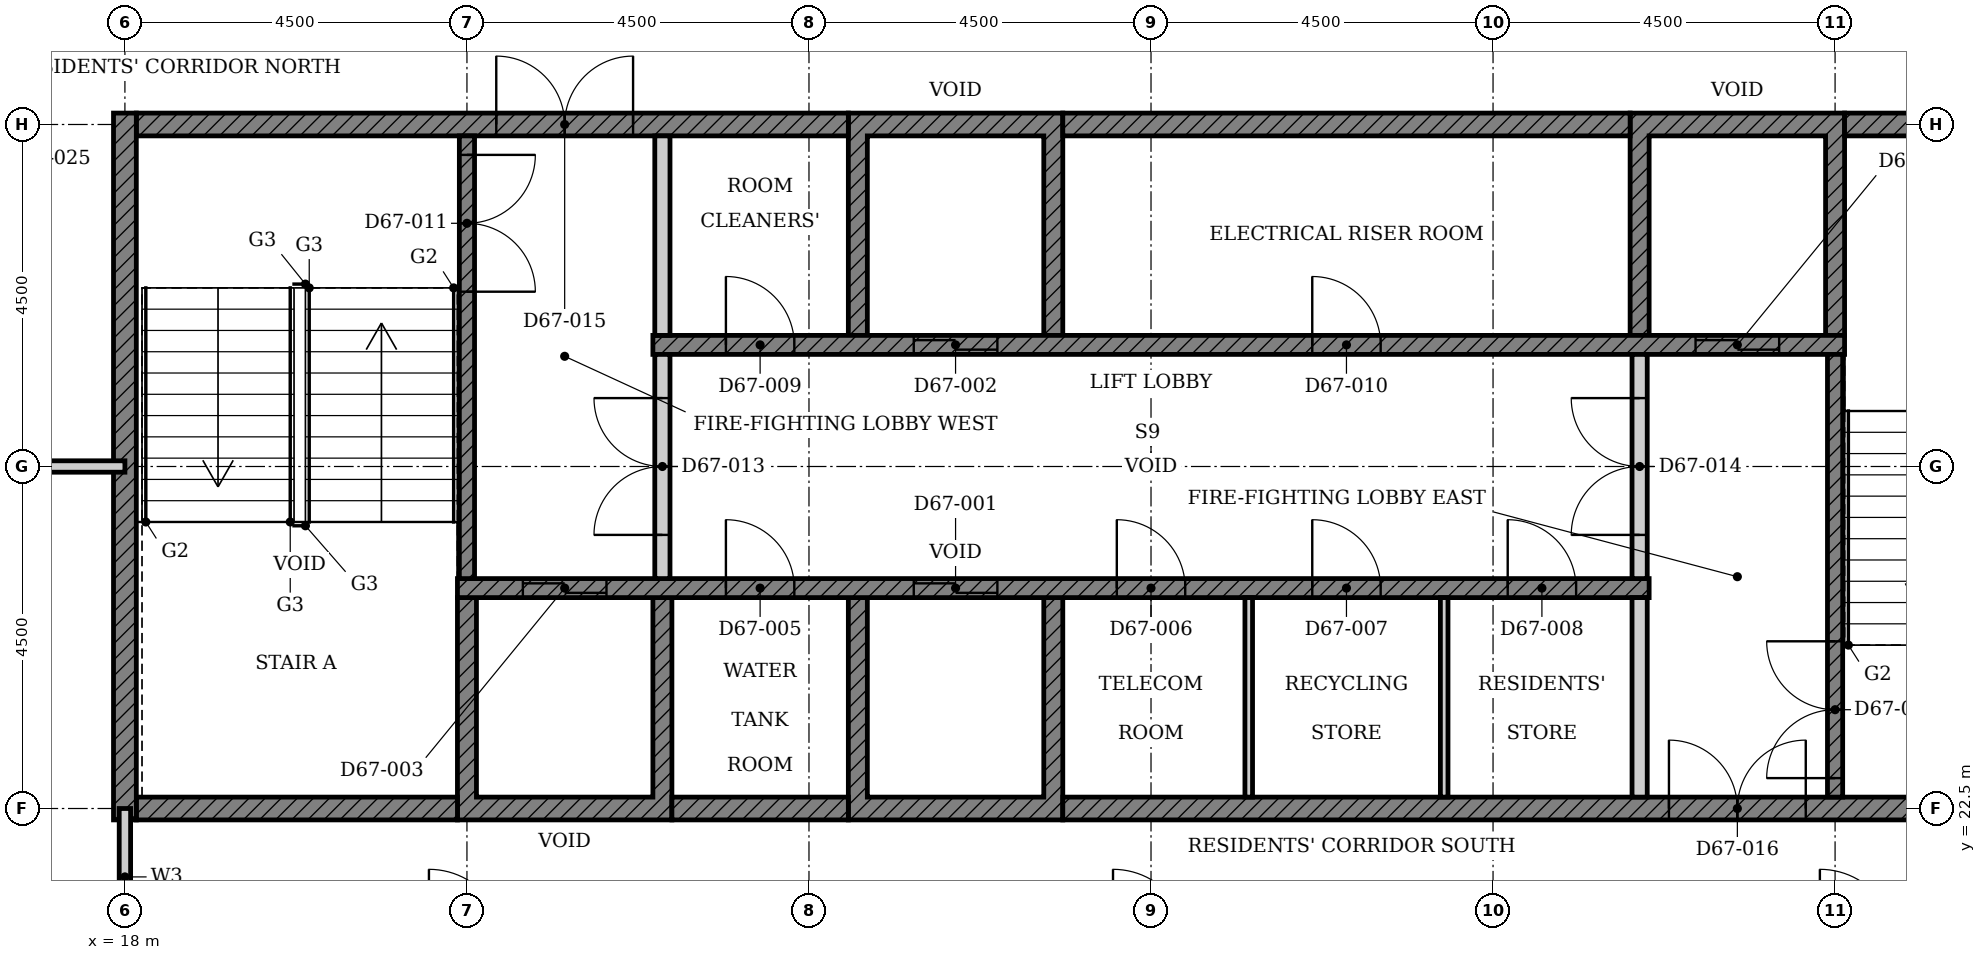
"""IFC4 building model, lengths in metres.
Left out: names, types, materials, properties, quantities, classifications, styles, units other than length and angle.
Written with IfcOpenShell. Run it as: python <this file> out.ifc"""

import sys

from ifc_helpers import new_model, si_unit, direction, frame, frame_2d, origin, place, context, subcontext, project, spatial, polyline, rectangle, outline, extrude, element, fill, save


model = new_model("IFC4")
c1 = context("Model", 3, precision=1e-05, world=origin(), true_north=direction((0.0, 1.0)))
c2 = subcontext(c1, "Body", "Model", "MODEL_VIEW")
j1 = project(units=[si_unit("LENGTHUNIT", "METRE"), si_unit("PLANEANGLEUNIT", "RADIAN")], contexts=[c1])
p1 = place(None, origin())
s1 = spatial("IfcSite", under=j1, at=p1, CompositionType="ELEMENT")
p2 = place(p1, origin())
s2 = spatial("IfcBuilding", under=s1, at=p2, CompositionType="ELEMENT")
p3 = place(p2, frame((0.0, 0.0, 263.8)))
s3 = spatial("IfcBuildingStorey", under=s2, at=p3, CompositionType="ELEMENT", Elevation=263.8)
p4 = place(p3, origin())
e1 = element("IfcWall", 1, at=p4, inside=s3, PredefinedType="SHEAR", context=c2, shape_type="SweptSolid", body=[
    extrude(outline(polyline([(22.375, 22.35), (25.197, 22.35), (25.197, 25.275), (24.947, 25.275), (24.947, 22.65), (22.625, 22.65), (22.625, 25.275), (22.375, 25.275), (22.375, 22.35)])), origin(), (0.0, 0.0, 1.0), 3.4),
])
p5 = place(p3, origin())
e2 = element("IfcWall", 2, at=p5, inside=s3, PredefinedType="SHEAR", context=c2, shape_type="SweptSolid", body=[
    extrude(outline(polyline([(27.518, 22.35), (30.339, 22.35), (30.339, 25.275), (30.089, 25.275), (30.089, 22.65), (27.768, 22.65), (27.768, 25.275), (27.518, 25.275), (27.518, 22.35)])), origin(), (0.0, 0.0, 1.0), 3.4),
])
p6 = place(p3, origin())
e3 = element("IfcWall", 3, at=p6, inside=s3, PredefinedType="SHEAR", context=c2, shape_type="SweptSolid", body=[
    extrude(outline(polyline([(27.518, 28.725), (27.768, 28.725), (27.768, 31.35), (30.089, 31.35), (30.089, 28.725), (30.339, 28.725), (30.339, 31.65), (27.518, 31.65), (27.518, 28.725)])), origin(), (0.0, 0.0, 1.0), 3.4),
])
p7 = place(p3, origin())
e4 = element("IfcWall", 4, at=p7, inside=s3, PredefinedType="SHEAR", context=c2, shape_type="SweptSolid", body=[
    extrude(outline(polyline([(37.803, 28.725), (38.053, 28.725), (38.053, 31.35), (40.375, 31.35), (40.375, 28.725), (40.625, 28.725), (40.625, 31.65), (37.803, 31.65), (37.803, 28.725)])), origin(), (0.0, 0.0, 1.0), 3.4),
])
p8 = place(p3, frame((18.15, 22.5, 0.0), z_axis=(0.0, 0.0, 1.0), x_axis=(1.0, 0.0, 0.0)))
e5 = element("IfcWall", 5, at=p8, inside=s3, PredefinedType="SHEAR", context=c2, shape_type="SweptSolid", body=[
    extrude(rectangle(XDim=4.225, YDim=0.3, at=frame_2d((2.113, 0.0))), origin(), (0.0, 0.0, 1.0), 3.4),
])
p9 = place(p3, frame((25.197, 22.5, 0.0), z_axis=(0.0, 0.0, 1.0), x_axis=(1.0, 0.0, 0.0)))
e6 = element("IfcWall", 6, at=p9, inside=s3, PredefinedType="SHEAR", context=c2, shape_type="SweptSolid", body=[
    extrude(rectangle(XDim=2.321, YDim=0.3, at=frame_2d((1.161, 0.0))), origin(), (0.0, 0.0, 1.0), 3.4),
])
p10 = place(p3, frame((30.339, 22.5, 0.0), z_axis=(0.0, 0.0, 1.0), x_axis=(1.0, 0.0, 0.0)))
e7 = element("IfcWall", 7, at=p10, inside=s3, PredefinedType="SHEAR", context=c2, shape_type="SweptSolid", body=[
    extrude(rectangle(XDim=14.511, YDim=0.3, at=frame_2d((7.255, 0.0))), origin(), (0.0, 0.0, 1.0), 3.4),
])
p11 = place(p10, frame((7.975, 0.0, 0.0)))
e8 = element("IfcOpeningElement", 8, at=p11, cuts=e7, PredefinedType="OPENING", context=c2, shape_type="SweptSolid", body=[
    extrude(rectangle(XDim=1.8, YDim=2.1, at=frame_2d((0.9, 1.05))), frame((0.0, 0.16, 0.0), z_axis=(0.0, -1.0, 0.0), x_axis=(1.0, 0.0, 0.0)), (0.0, 0.0, 1.0), 0.32),
])
p12 = place(p3, frame((18.15, 31.5, 0.0), z_axis=(0.0, 0.0, 1.0), x_axis=(1.0, 0.0, 0.0)))
e9 = element("IfcWall", 9, at=p12, inside=s3, PredefinedType="SHEAR", context=c2, shape_type="SweptSolid", body=[
    extrude(rectangle(XDim=9.368, YDim=0.3, at=frame_2d((4.684, 0.0))), origin(), (0.0, 0.0, 1.0), 3.4),
])
p13 = place(p12, frame((4.736, 0.0, 0.0)))
e10 = element("IfcOpeningElement", 10, at=p13, cuts=e9, PredefinedType="OPENING", context=c2, shape_type="SweptSolid", body=[
    extrude(rectangle(XDim=1.8, YDim=2.1, at=frame_2d((0.9, 1.05))), frame((0.0, 0.16, 0.0), z_axis=(0.0, -1.0, 0.0), x_axis=(1.0, 0.0, 0.0)), (0.0, 0.0, 1.0), 0.32),
])
p14 = place(p3, frame((30.339, 31.5, 0.0), z_axis=(0.0, 0.0, 1.0), x_axis=(1.0, 0.0, 0.0)))
e11 = element("IfcWall", 11, at=p14, inside=s3, PredefinedType="SHEAR", context=c2, shape_type="SweptSolid", body=[
    extrude(rectangle(XDim=7.464, YDim=0.3, at=frame_2d((3.732, 0.0))), origin(), (0.0, 0.0, 1.0), 3.4),
])
p15 = place(p3, frame((40.625, 31.5, 0.0), z_axis=(0.0, 0.0, 1.0), x_axis=(1.0, 0.0, 0.0)))
e12 = element("IfcWall", 12, at=p15, inside=s3, PredefinedType="SHEAR", context=c2, shape_type="SweptSolid", body=[
    extrude(rectangle(XDim=4.225, YDim=0.3, at=frame_2d((2.113, 0.0))), origin(), (0.0, 0.0, 1.0), 3.4),
])
p16 = place(p3, frame((18.0, 22.35, 0.0), z_axis=(0.0, 0.0, 1.0), x_axis=(0.0, 1.0, 0.0)))
e13 = element("IfcWall", 13, at=p16, inside=s3, PredefinedType="SHEAR", context=c2, shape_type="SweptSolid", body=[
    extrude(rectangle(XDim=9.3, YDim=0.3, at=frame_2d((4.65, 0.0))), origin(), (0.0, 0.0, 1.0), 3.4),
])
p17 = place(p3, frame((22.375, 25.4, 0.0), z_axis=(0.0, 0.0, 1.0), x_axis=(1.0, 0.0, 0.0)))
e14 = element("IfcWall", 14, at=p17, inside=s3, PredefinedType="SHEAR", context=c2, shape_type="SweptSolid", body=[
    extrude(rectangle(XDim=15.678, YDim=0.25, at=frame_2d((7.839, 0.0))), origin(), (0.0, 0.0, 1.0), 3.4),
])
p18 = place(p17, frame((6.004, 0.0, 0.0)))
e15 = element("IfcOpeningElement", 15, at=p18, cuts=e14, PredefinedType="OPENING", context=c2, shape_type="SweptSolid", body=[
    extrude(rectangle(XDim=1.1, YDim=2.1, at=frame_2d((0.55, 1.05))), frame((0.0, 0.135, 0.0), z_axis=(0.0, -1.0, 0.0), x_axis=(1.0, 0.0, 0.0)), (0.0, 0.0, 1.0), 0.27),
])
p19 = place(p17, frame((0.861, 0.0, 0.0)))
e16 = element("IfcOpeningElement", 16, at=p19, cuts=e14, PredefinedType="OPENING", context=c2, shape_type="SweptSolid", body=[
    extrude(rectangle(XDim=1.1, YDim=2.1, at=frame_2d((0.55, 1.05))), frame((0.0, 0.135, 0.0), z_axis=(0.0, -1.0, 0.0), x_axis=(1.0, 0.0, 0.0)), (0.0, 0.0, 1.0), 0.27),
])
p20 = place(p17, frame((3.532, 0.0, 0.0)))
e17 = element("IfcOpeningElement", 17, at=p20, cuts=e14, PredefinedType="OPENING", context=c2, shape_type="SweptSolid", body=[
    extrude(rectangle(XDim=0.9, YDim=2.1, at=frame_2d((0.45, 1.05))), frame((0.0, 0.135, 0.0), z_axis=(0.0, -1.0, 0.0), x_axis=(1.0, 0.0, 0.0)), (0.0, 0.0, 1.0), 0.27),
])
p21 = place(p17, frame((8.675, 0.0, 0.0)))
e18 = element("IfcOpeningElement", 18, at=p21, cuts=e14, PredefinedType="OPENING", context=c2, shape_type="SweptSolid", body=[
    extrude(rectangle(XDim=0.9, YDim=2.1, at=frame_2d((0.45, 1.05))), frame((0.0, 0.135, 0.0), z_axis=(0.0, -1.0, 0.0), x_axis=(1.0, 0.0, 0.0)), (0.0, 0.0, 1.0), 0.27),
])
p22 = place(p17, frame((11.246, 0.0, 0.0)))
e19 = element("IfcOpeningElement", 19, at=p22, cuts=e14, PredefinedType="OPENING", context=c2, shape_type="SweptSolid", body=[
    extrude(rectangle(XDim=0.9, YDim=2.1, at=frame_2d((0.45, 1.05))), frame((0.0, 0.135, 0.0), z_axis=(0.0, -1.0, 0.0), x_axis=(1.0, 0.0, 0.0)), (0.0, 0.0, 1.0), 0.27),
])
p23 = place(p17, frame((13.818, 0.0, 0.0)))
e20 = element("IfcOpeningElement", 20, at=p23, cuts=e14, PredefinedType="OPENING", context=c2, shape_type="SweptSolid", body=[
    extrude(rectangle(XDim=0.9, YDim=2.1, at=frame_2d((0.45, 1.05))), frame((0.0, 0.135, 0.0), z_axis=(0.0, -1.0, 0.0), x_axis=(1.0, 0.0, 0.0)), (0.0, 0.0, 1.0), 0.27),
])
p24 = place(p3, frame((24.947, 28.6, 0.0), z_axis=(0.0, 0.0, 1.0), x_axis=(1.0, 0.0, 0.0)))
e21 = element("IfcWall", 21, at=p24, inside=s3, PredefinedType="SHEAR", context=c2, shape_type="SweptSolid", body=[
    extrude(rectangle(XDim=15.678, YDim=0.25, at=frame_2d((7.839, 0.0))), origin(), (0.0, 0.0, 1.0), 3.4),
])
p25 = place(p24, frame((3.432, 0.0, 0.0)))
e22 = element("IfcOpeningElement", 22, at=p25, cuts=e21, PredefinedType="OPENING", context=c2, shape_type="SweptSolid", body=[
    extrude(rectangle(XDim=1.1, YDim=2.1, at=frame_2d((0.55, 1.05))), frame((0.0, 0.135, 0.0), z_axis=(0.0, -1.0, 0.0), x_axis=(1.0, 0.0, 0.0)), (0.0, 0.0, 1.0), 0.27),
])
p26 = place(p24, frame((13.718, 0.0, 0.0)))
e23 = element("IfcOpeningElement", 23, at=p26, cuts=e21, PredefinedType="OPENING", context=c2, shape_type="SweptSolid", body=[
    extrude(rectangle(XDim=1.1, YDim=2.1, at=frame_2d((0.55, 1.05))), frame((0.0, 0.135, 0.0), z_axis=(0.0, -1.0, 0.0), x_axis=(1.0, 0.0, 0.0)), (0.0, 0.0, 1.0), 0.27),
])
p27 = place(p24, frame((0.961, 0.0, 0.0)))
e24 = element("IfcOpeningElement", 24, at=p27, cuts=e21, PredefinedType="OPENING", context=c2, shape_type="SweptSolid", body=[
    extrude(rectangle(XDim=0.9, YDim=2.1, at=frame_2d((0.45, 1.05))), frame((0.0, 0.135, 0.0), z_axis=(0.0, -1.0, 0.0), x_axis=(1.0, 0.0, 0.0)), (0.0, 0.0, 1.0), 0.27),
])
p28 = place(p24, frame((8.675, 0.0, 0.0)))
e25 = element("IfcOpeningElement", 25, at=p28, cuts=e21, PredefinedType="OPENING", context=c2, shape_type="SweptSolid", body=[
    extrude(rectangle(XDim=0.9, YDim=2.1, at=frame_2d((0.45, 1.05))), frame((0.0, 0.135, 0.0), z_axis=(0.0, -1.0, 0.0), x_axis=(1.0, 0.0, 0.0)), (0.0, 0.0, 1.0), 0.27),
])
p29 = place(p3, frame((37.928, 22.65, 0.0), z_axis=(0.0, 0.0, 1.0), x_axis=(0.0, 1.0, 0.0)))
e26 = element("IfcWall", 26, at=p29, inside=s3, PredefinedType="PARTITIONING", context=c2, shape_type="SweptSolid", body=[
    extrude(rectangle(XDim=2.625, YDim=0.2, at=frame_2d((1.312, 0.0))), origin(), (0.0, 0.0, 1.0), 3.4),
])
for number, where, z_axis, x_axis in (
    (27, (32.786, 22.65, 0.0), (0.0, 0.0, 1.0), (0.0, 1.0, 0.0)),
    (28, (35.357, 22.65, 0.0), (0.0, 0.0, 1.0), (0.0, 1.0, 0.0)),
):
    element("IfcWall", number, at=place(p3, frame(where, z_axis=z_axis, x_axis=x_axis)), inside=s3, PredefinedType="PARTITIONING", context=c2, shape_type="SweptSolid", body=[
        extrude(rectangle(XDim=2.625, YDim=0.1, at=frame_2d((1.312, 0.0))), origin(), (0.0, 0.0, 1.0), 3.4),
    ])
p30 = place(p3, frame((25.072, 28.725, 0.0), z_axis=(0.0, 0.0, 1.0), x_axis=(0.0, 1.0, 0.0)))
e29 = element("IfcWall", 29, at=p30, inside=s3, PredefinedType="PARTITIONING", context=c2, shape_type="SweptSolid", body=[
    extrude(rectangle(XDim=2.625, YDim=0.2, at=frame_2d((1.312, 0.0))), origin(), (0.0, 0.0, 1.0), 3.4),
])
p31 = place(p3, frame((22.5, 31.35, 0.0), z_axis=(0.0, 0.0, 1.0), x_axis=(0.0, -1.0, 0.0)))
e30 = element("IfcWall", 30, at=p31, inside=s3, PredefinedType="SHEAR", context=c2, shape_type="SweptSolid", body=[
    extrude(rectangle(XDim=5.825, YDim=0.2, at=frame_2d((2.913, 0.0))), origin(), (0.0, 0.0, 1.0), 3.4),
])
p32 = place(p31, frame((0.25, 0.0, 0.0)))
e31 = element("IfcOpeningElement", 31, at=p32, cuts=e30, PredefinedType="OPENING", context=c2, shape_type="SweptSolid", body=[
    extrude(rectangle(XDim=1.8, YDim=2.1, at=frame_2d((0.9, 1.05))), frame((0.0, 0.11, 0.0), z_axis=(0.0, -1.0, 0.0), x_axis=(1.0, 0.0, 0.0)), (0.0, 0.0, 1.0), 0.22),
])
p33 = place(p3, frame((40.5, 22.65, 0.0), z_axis=(0.0, 0.0, 1.0), x_axis=(0.0, 1.0, 0.0)))
e32 = element("IfcWall", 32, at=p33, inside=s3, PredefinedType="SHEAR", context=c2, shape_type="SweptSolid", body=[
    extrude(rectangle(XDim=5.825, YDim=0.2, at=frame_2d((2.913, 0.0))), origin(), (0.0, 0.0, 1.0), 3.4),
])
p34 = place(p33, frame((0.25, 0.0, 0.0)))
e33 = element("IfcOpeningElement", 33, at=p34, cuts=e32, PredefinedType="OPENING", context=c2, shape_type="SweptSolid", body=[
    extrude(rectangle(XDim=1.8, YDim=2.1, at=frame_2d((0.9, 1.05))), frame((0.0, 0.11, 0.0), z_axis=(0.0, -1.0, 0.0), x_axis=(1.0, 0.0, 0.0)), (0.0, 0.0, 1.0), 0.22),
])
p35 = place(p3, frame((25.072, 25.525, 0.0), z_axis=(0.0, 0.0, 1.0), x_axis=(0.0, 1.0, 0.0)))
e34 = element("IfcWall", 34, at=p35, inside=s3, PredefinedType="PARTITIONING", context=c2, shape_type="SweptSolid", body=[
    extrude(rectangle(XDim=2.95, YDim=0.2, at=frame_2d((1.475, 0.0))), origin(), (0.0, 0.0, 1.0), 3.4),
])
p36 = place(p35, frame((0.575, 0.0, 0.0)))
e35 = element("IfcOpeningElement", 35, at=p36, cuts=e34, PredefinedType="OPENING", context=c2, shape_type="SweptSolid", body=[
    extrude(rectangle(XDim=1.8, YDim=2.1, at=frame_2d((0.9, 1.05))), frame((0.0, 0.11, 0.0), z_axis=(0.0, -1.0, 0.0), x_axis=(1.0, 0.0, 0.0)), (0.0, 0.0, 1.0), 0.22),
])
p37 = place(p3, frame((37.928, 25.525, 0.0), z_axis=(0.0, 0.0, 1.0), x_axis=(0.0, 1.0, 0.0)))
e36 = element("IfcWall", 36, at=p37, inside=s3, PredefinedType="PARTITIONING", context=c2, shape_type="SweptSolid", body=[
    extrude(rectangle(XDim=2.95, YDim=0.2, at=frame_2d((1.475, 0.0))), origin(), (0.0, 0.0, 1.0), 3.4),
])
p38 = place(p37, frame((0.575, 0.0, 0.0)))
e37 = element("IfcOpeningElement", 37, at=p38, cuts=e36, PredefinedType="OPENING", context=c2, shape_type="SweptSolid", body=[
    extrude(rectangle(XDim=1.8, YDim=2.1, at=frame_2d((0.9, 1.05))), frame((0.0, 0.11, 0.0), z_axis=(0.0, -1.0, 0.0), x_axis=(1.0, 0.0, 0.0)), (0.0, 0.0, 1.0), 0.22),
])
p39 = place(p3, frame((4.5, 27.0, 0.0), z_axis=(0.0, 0.0, 1.0), x_axis=(1.0, 0.0, 0.0)))
e38 = element("IfcWall", 38, at=p39, inside=s3, PredefinedType="PARTITIONING", context=c2, shape_type="SweptSolid", body=[
    extrude(rectangle(XDim=13.5, YDim=0.15, at=frame_2d((6.75, 0.0))), origin(), (0.0, 0.0, 1.0), 2.68),
])
p40 = place(p39, frame((5.35, 0.0, 0.0)))
e39 = element("IfcOpeningElement", 39, at=p40, cuts=e38, PredefinedType="OPENING", context=c2, shape_type="SweptSolid", body=[
    extrude(rectangle(XDim=1.0, YDim=2.1, at=frame_2d((0.5, 1.05))), frame((0.0, 0.085, 0.0), z_axis=(0.0, -1.0, 0.0), x_axis=(1.0, 0.0, 0.0)), (0.0, 0.0, 1.0), 0.17),
])
p41 = place(p3, frame((18.0, 20.7, 0.0), z_axis=(0.0, 0.0, 1.0), x_axis=(0.0, 1.0, 0.0)))
e40 = element("IfcWall", 40, at=p41, inside=s3, PredefinedType="PARTITIONING", context=c2, shape_type="SweptSolid", body=[
    extrude(rectangle(XDim=1.8, YDim=0.15, at=frame_2d((0.9, 0.0))), origin(), (0.0, 0.0, 1.0), 3.4),
])
p42 = place(p18, origin())
e41 = element("IfcDoor", 41, at=p42, inside=s3, OperationType="DOUBLE_DOOR_SLIDING", PredefinedType="DOOR", context=c2, shape_type="SweptSolid", body=[
    extrude(rectangle(XDim=1.1, YDim=2.1, at=frame_2d((0.55, 1.05))), frame((0.0, 0.025, 0.0), z_axis=(0.0, -1.0, 0.0), x_axis=(1.0, 0.0, 0.0)), (0.0, 0.0, 1.0), 0.05),
])
fill(e15, e41)
p43 = place(p25, origin())
e42 = element("IfcDoor", 42, at=p43, inside=s3, OperationType="DOUBLE_DOOR_SLIDING", PredefinedType="DOOR", context=c2, shape_type="SweptSolid", body=[
    extrude(rectangle(XDim=1.1, YDim=2.1, at=frame_2d((0.55, 1.05))), frame((0.0, 0.025, 0.0), z_axis=(0.0, -1.0, 0.0), x_axis=(1.0, 0.0, 0.0)), (0.0, 0.0, 1.0), 0.05),
])
fill(e22, e42)
p44 = place(p19, origin())
e43 = element("IfcDoor", 43, at=p44, inside=s3, OperationType="DOUBLE_DOOR_SLIDING", PredefinedType="DOOR", context=c2, shape_type="SweptSolid", body=[
    extrude(rectangle(XDim=1.1, YDim=2.1, at=frame_2d((0.55, 1.05))), frame((0.0, 0.025, 0.0), z_axis=(0.0, -1.0, 0.0), x_axis=(1.0, 0.0, 0.0)), (0.0, 0.0, 1.0), 0.05),
])
fill(e16, e43)
p45 = place(p26, origin())
e44 = element("IfcDoor", 44, at=p45, inside=s3, OperationType="DOUBLE_DOOR_SLIDING", PredefinedType="DOOR", context=c2, shape_type="SweptSolid", body=[
    extrude(rectangle(XDim=1.1, YDim=2.1, at=frame_2d((0.55, 1.05))), frame((0.0, 0.025, 0.0), z_axis=(0.0, -1.0, 0.0), x_axis=(1.0, 0.0, 0.0)), (0.0, 0.0, 1.0), 0.05),
])
fill(e23, e44)
p46 = place(p20, origin())
e45 = element("IfcDoor", 45, at=p46, inside=s3, OperationType="SINGLE_SWING_LEFT", PredefinedType="DOOR", context=c2, shape_type="SweptSolid", body=[
    extrude(rectangle(XDim=0.9, YDim=2.1, at=frame_2d((0.45, 1.05))), frame((0.0, 0.025, 0.0), z_axis=(0.0, -1.0, 0.0), x_axis=(1.0, 0.0, 0.0)), (0.0, 0.0, 1.0), 0.05),
])
fill(e17, e45)
p47 = place(p21, origin())
e46 = element("IfcDoor", 46, at=p47, inside=s3, OperationType="SINGLE_SWING_LEFT", PredefinedType="DOOR", context=c2, shape_type="SweptSolid", body=[
    extrude(rectangle(XDim=0.9, YDim=2.1, at=frame_2d((0.45, 1.05))), frame((0.0, 0.025, 0.0), z_axis=(0.0, -1.0, 0.0), x_axis=(1.0, 0.0, 0.0)), (0.0, 0.0, 1.0), 0.05),
])
fill(e18, e46)
p48 = place(p22, origin())
e47 = element("IfcDoor", 47, at=p48, inside=s3, OperationType="SINGLE_SWING_LEFT", PredefinedType="DOOR", context=c2, shape_type="SweptSolid", body=[
    extrude(rectangle(XDim=0.9, YDim=2.1, at=frame_2d((0.45, 1.05))), frame((0.0, 0.025, 0.0), z_axis=(0.0, -1.0, 0.0), x_axis=(1.0, 0.0, 0.0)), (0.0, 0.0, 1.0), 0.05),
])
fill(e19, e47)
p49 = place(p23, origin())
e48 = element("IfcDoor", 48, at=p49, inside=s3, OperationType="SINGLE_SWING_LEFT", PredefinedType="DOOR", context=c2, shape_type="SweptSolid", body=[
    extrude(rectangle(XDim=0.9, YDim=2.1, at=frame_2d((0.45, 1.05))), frame((0.0, 0.025, 0.0), z_axis=(0.0, -1.0, 0.0), x_axis=(1.0, 0.0, 0.0)), (0.0, 0.0, 1.0), 0.05),
])
fill(e20, e48)
p50 = place(p27, origin())
e49 = element("IfcDoor", 49, at=p50, inside=s3, OperationType="SINGLE_SWING_LEFT", PredefinedType="DOOR", context=c2, shape_type="SweptSolid", body=[
    extrude(rectangle(XDim=0.9, YDim=2.1, at=frame_2d((0.45, 1.05))), frame((0.0, 0.025, 0.0), z_axis=(0.0, -1.0, 0.0), x_axis=(1.0, 0.0, 0.0)), (0.0, 0.0, 1.0), 0.05),
])
fill(e24, e49)
p51 = place(p28, origin())
e50 = element("IfcDoor", 50, at=p51, inside=s3, OperationType="SINGLE_SWING_LEFT", PredefinedType="DOOR", context=c2, shape_type="SweptSolid", body=[
    extrude(rectangle(XDim=0.9, YDim=2.1, at=frame_2d((0.45, 1.05))), frame((0.0, 0.025, 0.0), z_axis=(0.0, -1.0, 0.0), x_axis=(1.0, 0.0, 0.0)), (0.0, 0.0, 1.0), 0.05),
])
fill(e25, e50)
p52 = place(p32, origin())
e51 = element("IfcDoor", 51, at=p52, inside=s3, OperationType="DOUBLE_DOOR_SINGLE_SWING", PredefinedType="DOOR", context=c2, shape_type="SweptSolid", body=[
    extrude(rectangle(XDim=1.8, YDim=2.1, at=frame_2d((0.9, 1.05))), frame((0.0, 0.025, 0.0), z_axis=(0.0, -1.0, 0.0), x_axis=(1.0, 0.0, 0.0)), (0.0, 0.0, 1.0), 0.05),
])
fill(e31, e51)
p53 = place(p34, origin())
e52 = element("IfcDoor", 52, at=p53, inside=s3, OperationType="DOUBLE_DOOR_SINGLE_SWING", PredefinedType="DOOR", context=c2, shape_type="SweptSolid", body=[
    extrude(rectangle(XDim=1.8, YDim=2.1, at=frame_2d((0.9, 1.05))), frame((0.0, 0.025, 0.0), z_axis=(0.0, -1.0, 0.0), x_axis=(1.0, 0.0, 0.0)), (0.0, 0.0, 1.0), 0.05),
])
fill(e33, e52)
p54 = place(p36, origin())
e53 = element("IfcDoor", 53, at=p54, inside=s3, OperationType="DOUBLE_DOOR_SINGLE_SWING", PredefinedType="DOOR", context=c2, shape_type="SweptSolid", body=[
    extrude(rectangle(XDim=1.8, YDim=2.1, at=frame_2d((0.9, 1.05))), frame((0.0, 0.025, 0.0), z_axis=(0.0, -1.0, 0.0), x_axis=(1.0, 0.0, 0.0)), (0.0, 0.0, 1.0), 0.05),
])
fill(e35, e53)
p55 = place(p38, origin())
e54 = element("IfcDoor", 54, at=p55, inside=s3, OperationType="DOUBLE_DOOR_SINGLE_SWING", PredefinedType="DOOR", context=c2, shape_type="SweptSolid", body=[
    extrude(rectangle(XDim=1.8, YDim=2.1, at=frame_2d((0.9, 1.05))), frame((0.0, 0.025, 0.0), z_axis=(0.0, -1.0, 0.0), x_axis=(1.0, 0.0, 0.0)), (0.0, 0.0, 1.0), 0.05),
])
fill(e37, e54)
p56 = place(p13, origin())
e55 = element("IfcDoor", 55, at=p56, inside=s3, OperationType="DOUBLE_DOOR_SINGLE_SWING", PredefinedType="DOOR", context=c2, shape_type="SweptSolid", body=[
    extrude(rectangle(XDim=1.8, YDim=2.1, at=frame_2d((0.9, 1.05))), frame((0.0, 0.025, 0.0), z_axis=(0.0, -1.0, 0.0), x_axis=(1.0, 0.0, 0.0)), (0.0, 0.0, 1.0), 0.05),
])
fill(e10, e55)
p57 = place(p11, origin())
e56 = element("IfcDoor", 56, at=p57, inside=s3, OperationType="DOUBLE_DOOR_SINGLE_SWING", PredefinedType="DOOR", context=c2, shape_type="SweptSolid", body=[
    extrude(rectangle(XDim=1.8, YDim=2.1, at=frame_2d((0.9, 1.05))), frame((0.0, 0.025, 0.0), z_axis=(0.0, -1.0, 0.0), x_axis=(1.0, 0.0, 0.0)), (0.0, 0.0, 1.0), 0.05),
])
fill(e8, e56)
save(model, sys.argv[1])
